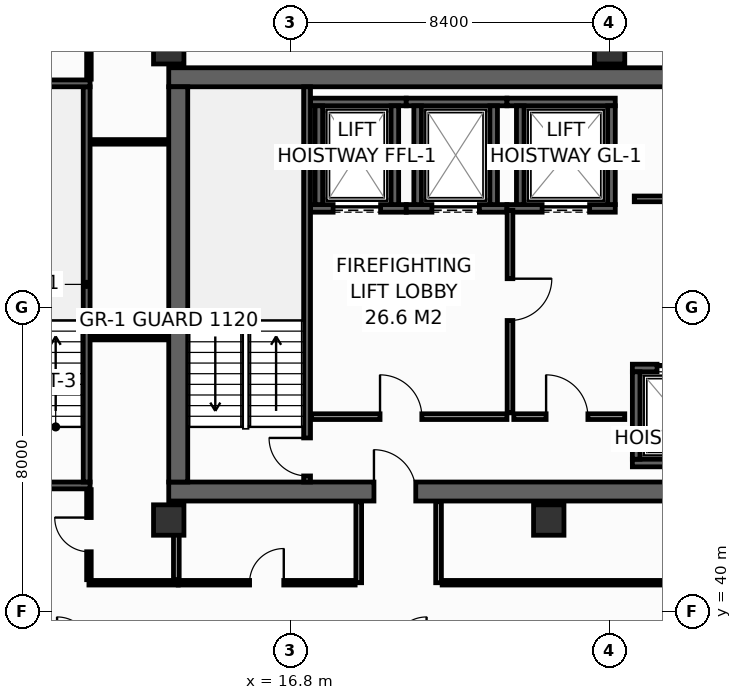
"""IFC4 building model, lengths in metres.
Left out: names, types, materials, properties, quantities, classifications, styles, units other than length and angle.
Written with IfcOpenShell. Run it as: python <this file> out.ifc"""

import sys

from ifc_helpers import new_model, si_unit, direction, frame, frame_2d, origin, origin_2d, place, context, subcontext, project, spatial, rectangle, hollow_rectangle, extrude, element, fill, save


model = new_model("IFC4")
c1 = context("Model", 3, precision=1e-05, world=origin(), true_north=direction((0.0, 1.0)))
c2 = subcontext(c1, "Body", "Model", "MODEL_VIEW")
j1 = project(units=[si_unit("LENGTHUNIT", "METRE"), si_unit("PLANEANGLEUNIT", "RADIAN")], contexts=[c1])
p1 = place(None, origin())
s1 = spatial("IfcSite", under=j1, at=p1, CompositionType="ELEMENT")
p2 = place(p1, origin())
s2 = spatial("IfcBuilding", under=s1, at=p2, CompositionType="ELEMENT")
p3 = place(p2, frame((0.0, 0.0, 220.8)))
s3 = spatial("IfcBuildingStorey", under=s2, at=p3, CompositionType="ELEMENT", Elevation=220.8)
p4 = place(p3, frame((13.6, 43.15, 0.0), z_axis=(0.0, 0.0, 1.0), x_axis=(1.0, 0.0, 0.0)))
e1 = element("IfcWall", 1, at=p4, inside=s3, PredefinedType="SHEAR", context=c2, shape_type="SweptSolid", body=[
    extrude(rectangle(XDim=32.7, YDim=0.5, at=frame_2d((16.35, 0.0))), origin(), (0.0, 0.0, 1.0), 3.35),
])
p5 = place(p4, frame((5.4, 0.0, 0.0)))
e2 = element("IfcOpeningElement", 2, at=p5, cuts=e1, PredefinedType="OPENING", context=c2, shape_type="SweptSolid", body=[
    extrude(rectangle(XDim=1.1, YDim=2.15, at=frame_2d((0.55, 1.075))), frame((0.0, 0.26, 0.0), z_axis=(0.0, -1.0, 0.0), x_axis=(1.0, 0.0, 0.0)), (0.0, 0.0, 1.0), 0.52),
])
p6 = place(p4, frame((25.6, 0.0, 0.0)))
e3 = element("IfcOpeningElement", 3, at=p6, cuts=e1, PredefinedType="OPENING", context=c2, shape_type="SweptSolid", body=[
    extrude(rectangle(XDim=1.1, YDim=2.15, at=frame_2d((0.55, 1.075))), frame((0.0, 0.26, 0.0), z_axis=(0.0, -1.0, 0.0), x_axis=(1.0, 0.0, 0.0)), (0.0, 0.0, 1.0), 0.52),
])
p7 = place(p3, frame((13.6, 54.05, 0.0), z_axis=(0.0, 0.0, 1.0), x_axis=(1.0, 0.0, 0.0)))
e4 = element("IfcWall", 4, at=p7, inside=s3, PredefinedType="SHEAR", context=c2, shape_type="SweptSolid", body=[
    extrude(rectangle(XDim=32.7, YDim=0.5, at=frame_2d((16.35, 0.0))), origin(), (0.0, 0.0, 1.0), 3.35),
])
p8 = place(p3, frame((13.85, 43.4, 0.0), z_axis=(0.0, 0.0, 1.0), x_axis=(0.0, 1.0, 0.0)))
e5 = element("IfcWall", 5, at=p8, inside=s3, PredefinedType="SHEAR", context=c2, shape_type="SweptSolid", body=[
    extrude(rectangle(XDim=10.4, YDim=0.5, at=frame_2d((5.2, 0.0))), origin(), (0.0, 0.0, 1.0), 3.35),
])
for number, where, z_axis, x_axis in (
    (6, (13.6, 54.8, 0.0), (0.0, 0.0, 1.0), (1.0, 0.0, 0.0)),
    (7, (25.2, 54.8, 0.0), (0.0, 0.0, 1.0), (1.0, 0.0, 0.0)),
    (8, (13.6, 42.4, 0.0), (0.0, 0.0, 1.0), (1.0, 0.0, 0.0)),
    (9, (23.6, 42.4, 0.0), (0.0, 0.0, 1.0), (1.0, 0.0, 0.0)),
):
    element("IfcColumn", number, at=place(p3, frame(where, z_axis=z_axis, x_axis=x_axis)), inside=s3, PredefinedType="COLUMN", context=c2, shape_type="SweptSolid", body=[
        extrude(hollow_rectangle(XDim=0.8, YDim=0.8, WallThickness=0.036, at=origin_2d()), origin(), (0.0, 0.0, 1.0), 3.8),
    ])
p9 = place(p3, frame((17.33, 50.6, 0.0), z_axis=(0.0, 0.0, 1.0), x_axis=(1.0, 0.0, 0.0)))
e10 = element("IfcWall", 10, at=p9, inside=s3, PredefinedType="SHEAR", context=c2, shape_type="SweptSolid", body=[
    extrude(rectangle(XDim=2.52, YDim=0.2, at=frame_2d((1.26, 0.0))), origin(), (0.0, 0.0, 1.0), 3.35),
])
p10 = place(p9, frame((0.595, 0.0, 0.0)))
e11 = element("IfcOpeningElement", 11, at=p10, cuts=e10, PredefinedType="OPENING", context=c2, shape_type="SweptSolid", body=[
    extrude(rectangle(XDim=1.25, YDim=2.3, at=frame_2d((0.625, 1.15))), frame((0.0, 0.11, 0.0), z_axis=(0.0, -1.0, 0.0), x_axis=(1.0, 0.0, 0.0)), (0.0, 0.0, 1.0), 0.22),
])
p11 = place(p3, frame((17.33, 53.4, 0.0), z_axis=(0.0, 0.0, 1.0), x_axis=(1.0, 0.0, 0.0)))
e12 = element("IfcWall", 12, at=p11, inside=s3, PredefinedType="SHEAR", context=c2, shape_type="SweptSolid", body=[
    extrude(rectangle(XDim=2.52, YDim=0.2, at=frame_2d((1.26, 0.0))), origin(), (0.0, 0.0, 1.0), 3.35),
])
for number, where, z_axis, x_axis in (
    (13, (17.55, 50.7, 0.0), (0.0, 0.0, 1.0), (0.0, 1.0, 0.0)),
    (14, (19.55, 50.7, 0.0), (0.0, 0.0, 1.0), (0.0, 1.0, 0.0)),
):
    element("IfcWall", number, at=place(p3, frame(where, z_axis=z_axis, x_axis=x_axis)), inside=s3, PredefinedType="SHEAR", context=c2, shape_type="SweptSolid", body=[
        extrude(rectangle(XDim=2.6, YDim=0.2, at=frame_2d((1.3, 0.0))), origin(), (0.0, 0.0, 1.0), 3.35),
    ])
p12 = place(p3, frame((19.85, 50.6, 0.0), z_axis=(0.0, 0.0, 1.0), x_axis=(1.0, 0.0, 0.0)))
e15 = element("IfcWall", 15, at=p12, inside=s3, PredefinedType="SHEAR", context=c2, shape_type="SweptSolid", body=[
    extrude(rectangle(XDim=2.65, YDim=0.2, at=frame_2d((1.325, 0.0))), origin(), (0.0, 0.0, 1.0), 3.35),
])
p13 = place(p12, frame((0.675, 0.0, 0.0)))
e16 = element("IfcOpeningElement", 16, at=p13, cuts=e15, PredefinedType="OPENING", context=c2, shape_type="SweptSolid", body=[
    extrude(rectangle(XDim=1.25, YDim=2.3, at=frame_2d((0.625, 1.15))), frame((0.0, 0.11, 0.0), z_axis=(0.0, -1.0, 0.0), x_axis=(1.0, 0.0, 0.0)), (0.0, 0.0, 1.0), 0.22),
])
p14 = place(p3, frame((19.85, 53.4, 0.0), z_axis=(0.0, 0.0, 1.0), x_axis=(1.0, 0.0, 0.0)))
e17 = element("IfcWall", 17, at=p14, inside=s3, PredefinedType="SHEAR", context=c2, shape_type="SweptSolid", body=[
    extrude(rectangle(XDim=2.65, YDim=0.2, at=frame_2d((1.325, 0.0))), origin(), (0.0, 0.0, 1.0), 3.35),
])
for number, where, z_axis, x_axis in (
    (18, (20.15, 50.7, 0.0), (0.0, 0.0, 1.0), (0.0, 1.0, 0.0)),
    (19, (22.15, 50.7, 0.0), (0.0, 0.0, 1.0), (0.0, 1.0, 0.0)),
):
    element("IfcWall", number, at=place(p3, frame(where, z_axis=z_axis, x_axis=x_axis)), inside=s3, PredefinedType="SHEAR", context=c2, shape_type="SweptSolid", body=[
        extrude(rectangle(XDim=2.6, YDim=0.2, at=frame_2d((1.3, 0.0))), origin(), (0.0, 0.0, 1.0), 3.35),
    ])
p15 = place(p3, frame((22.5, 50.6, 0.0), z_axis=(0.0, 0.0, 1.0), x_axis=(1.0, 0.0, 0.0)))
e20 = element("IfcWall", 20, at=p15, inside=s3, PredefinedType="SHEAR", context=c2, shape_type="SweptSolid", body=[
    extrude(rectangle(XDim=2.85, YDim=0.2, at=frame_2d((1.425, 0.0))), origin(), (0.0, 0.0, 1.0), 3.35),
])
p16 = place(p15, frame((0.925, 0.0, 0.0)))
e21 = element("IfcOpeningElement", 21, at=p16, cuts=e20, PredefinedType="OPENING", context=c2, shape_type="SweptSolid", body=[
    extrude(rectangle(XDim=1.25, YDim=2.3, at=frame_2d((0.625, 1.15))), frame((0.0, 0.11, 0.0), z_axis=(0.0, -1.0, 0.0), x_axis=(1.0, 0.0, 0.0)), (0.0, 0.0, 1.0), 0.22),
])
p17 = place(p3, frame((22.5, 53.4, 0.0), z_axis=(0.0, 0.0, 1.0), x_axis=(1.0, 0.0, 0.0)))
e22 = element("IfcWall", 22, at=p17, inside=s3, PredefinedType="SHEAR", context=c2, shape_type="SweptSolid", body=[
    extrude(rectangle(XDim=2.85, YDim=0.2, at=frame_2d((1.425, 0.0))), origin(), (0.0, 0.0, 1.0), 3.35),
])
for number, where, z_axis, x_axis in (
    (23, (22.85, 50.7, 0.0), (0.0, 0.0, 1.0), (0.0, 1.0, 0.0)),
    (24, (25.25, 50.7, 0.0), (0.0, 0.0, 1.0), (0.0, 1.0, 0.0)),
):
    element("IfcWall", number, at=place(p3, frame(where, z_axis=z_axis, x_axis=x_axis)), inside=s3, PredefinedType="SHEAR", context=c2, shape_type="SweptSolid", body=[
        extrude(rectangle(XDim=2.6, YDim=0.2, at=frame_2d((1.3, 0.0))), origin(), (0.0, 0.0, 1.0), 3.35),
    ])
p18 = place(p3, frame((25.8, 43.9, 0.0), z_axis=(0.0, 0.0, 1.0), x_axis=(1.0, 0.0, 0.0)))
e25 = element("IfcWall", 25, at=p18, inside=s3, PredefinedType="SHEAR", context=c2, shape_type="SweptSolid", body=[
    extrude(rectangle(XDim=2.575, YDim=0.2, at=frame_2d((1.288, 0.0))), origin(), (0.0, 0.0, 1.0), 3.13),
])
p19 = place(p3, frame((25.8, 46.4, 0.0), z_axis=(0.0, 0.0, 1.0), x_axis=(1.0, 0.0, 0.0)))
e26 = element("IfcWall", 26, at=p19, inside=s3, PredefinedType="SHEAR", context=c2, shape_type="SweptSolid", body=[
    extrude(rectangle(XDim=2.575, YDim=0.2, at=frame_2d((1.288, 0.0))), origin(), (0.0, 0.0, 1.0), 3.13),
])
p20 = place(p19, frame((0.65, 0.0, 0.0)))
e27 = element("IfcOpeningElement", 27, at=p20, cuts=e26, PredefinedType="OPENING", context=c2, shape_type="SweptSolid", body=[
    extrude(rectangle(XDim=1.1, YDim=2.2, at=frame_2d((0.55, 1.1))), frame((0.0, 0.11, 0.0), z_axis=(0.0, -1.0, 0.0), x_axis=(1.0, 0.0, 0.0)), (0.0, 0.0, 1.0), 0.22),
])
p21 = place(p3, frame((25.9, 44.0, 0.0), z_axis=(0.0, 0.0, 1.0), x_axis=(0.0, 1.0, 0.0)))
e28 = element("IfcWall", 28, at=p21, inside=s3, PredefinedType="SHEAR", context=c2, shape_type="SweptSolid", body=[
    extrude(rectangle(XDim=2.3, YDim=0.2, at=frame_2d((1.15, 0.0))), origin(), (0.0, 0.0, 1.0), 3.13),
])
p22 = place(p3, frame((17.24, 43.4, 0.0), z_axis=(0.0, 0.0, 1.0), x_axis=(0.0, 1.0, 0.0)))
e29 = element("IfcWall", 29, at=p22, inside=s3, PredefinedType="SHEAR", context=c2, shape_type="SweptSolid", body=[
    extrude(rectangle(XDim=10.4, YDim=0.18, at=frame_2d((5.2, 0.0))), origin(), (0.0, 0.0, 1.0), 3.35),
])
p23 = place(p22, frame((0.16, 0.0, 0.0)))
e30 = element("IfcOpeningElement", 30, at=p23, cuts=e29, PredefinedType="OPENING", context=c2, shape_type="SweptSolid", body=[
    extrude(rectangle(XDim=1.0, YDim=2.15, at=frame_2d((0.5, 1.075))), frame((0.0, 0.1, 0.0), z_axis=(0.0, -1.0, 0.0), x_axis=(1.0, 0.0, 0.0)), (0.0, 0.0, 1.0), 0.2),
])
p24 = place(p3, frame((8.12, 43.31, 0.0), z_axis=(0.0, 0.0, 1.0), x_axis=(1.0, 0.0, 0.0)))
e31 = element("IfcWall", 31, at=p24, inside=s3, PredefinedType="SHEAR", context=c2, shape_type="SweptSolid", body=[
    extrude(rectangle(XDim=3.41, YDim=0.18, at=frame_2d((1.705, 0.0))), origin(), (0.0, 0.0, 1.0), 3.35),
])
p25 = place(p24, frame((1.15, 0.0, 0.0)))
e32 = element("IfcOpeningElement", 32, at=p25, cuts=e31, PredefinedType="OPENING", context=c2, shape_type="SweptSolid", body=[
    extrude(rectangle(XDim=1.1, YDim=2.15, at=frame_2d((0.55, 1.075))), frame((0.0, 0.1, 0.0), z_axis=(0.0, -1.0, 0.0), x_axis=(1.0, 0.0, 0.0)), (0.0, 0.0, 1.0), 0.2),
])
p26 = place(p3, frame((11.44, 43.4, 0.0), z_axis=(0.0, 0.0, 1.0), x_axis=(0.0, 1.0, 0.0)))
e33 = element("IfcWall", 33, at=p26, inside=s3, PredefinedType="SHEAR", context=c2, shape_type="SweptSolid", body=[
    extrude(rectangle(XDim=10.4, YDim=0.18, at=frame_2d((5.2, 0.0))), origin(), (0.0, 0.0, 1.0), 3.35),
])
p27 = place(p3, frame((11.53, 53.89, 0.0), z_axis=(0.0, 0.0, 1.0), x_axis=(-1.0, 0.0, 0.0)))
e34 = element("IfcWall", 34, at=p27, inside=s3, PredefinedType="SHEAR", context=c2, shape_type="SweptSolid", body=[
    extrude(rectangle(XDim=3.41, YDim=0.18, at=frame_2d((1.705, 0.0))), origin(), (0.0, 0.0, 1.0), 3.35),
])
p28 = place(p3, frame((17.36, 45.12, 0.0), z_axis=(0.0, 0.0, 1.0), x_axis=(1.0, 0.0, 0.0)))
e35 = element("IfcWall", 35, at=p28, inside=s3, PredefinedType="PARTITIONING", context=c2, shape_type="SweptSolid", body=[
    extrude(rectangle(XDim=5.14, YDim=0.15, at=frame_2d((2.57, 0.0))), origin(), (0.0, 0.0, 1.0), 3.35),
])
p29 = place(p28, frame((1.8, 0.0, 0.0)))
e36 = element("IfcOpeningElement", 36, at=p29, cuts=e35, PredefinedType="OPENING", context=c2, shape_type="SweptSolid", body=[
    extrude(rectangle(XDim=1.1, YDim=2.15, at=frame_2d((0.55, 1.075))), frame((0.0, 0.085, 0.0), z_axis=(0.0, -1.0, 0.0), x_axis=(1.0, 0.0, 0.0)), (0.0, 0.0, 1.0), 0.17),
])
p30 = place(p3, frame((22.58, 50.55, 0.0), z_axis=(0.0, 0.0, 1.0), x_axis=(0.0, -1.0, 0.0)))
e37 = element("IfcWall", 37, at=p30, inside=s3, PredefinedType="PARTITIONING", context=c2, shape_type="SweptSolid", body=[
    extrude(rectangle(XDim=5.33, YDim=0.15, at=frame_2d((2.665, 0.0))), origin(), (0.0, 0.0, 1.0), 3.35),
])
p31 = place(p30, frame((1.8, 0.0, 0.0)))
e38 = element("IfcOpeningElement", 38, at=p31, cuts=e37, PredefinedType="OPENING", context=c2, shape_type="SweptSolid", body=[
    extrude(rectangle(XDim=1.1, YDim=2.15, at=frame_2d((0.55, 1.075))), frame((0.0, 0.085, 0.0), z_axis=(0.0, -1.0, 0.0), x_axis=(1.0, 0.0, 0.0)), (0.0, 0.0, 1.0), 0.17),
])
p32 = place(p3, frame((22.68, 45.12, 0.0), z_axis=(0.0, 0.0, 1.0), x_axis=(1.0, 0.0, 0.0)))
e39 = element("IfcWall", 39, at=p32, inside=s3, PredefinedType="PARTITIONING", context=c2, shape_type="SweptSolid", body=[
    extrude(rectangle(XDim=2.92, YDim=0.15, at=frame_2d((1.46, 0.0))), origin(), (0.0, 0.0, 1.0), 3.35),
])
p33 = place(p32, frame((0.85, 0.0, 0.0)))
e40 = element("IfcOpeningElement", 40, at=p33, cuts=e39, PredefinedType="OPENING", context=c2, shape_type="SweptSolid", body=[
    extrude(rectangle(XDim=1.1, YDim=2.15, at=frame_2d((0.55, 1.075))), frame((0.0, 0.085, 0.0), z_axis=(0.0, -1.0, 0.0), x_axis=(1.0, 0.0, 0.0)), (0.0, 0.0, 1.0), 0.17),
])
p34 = place(p3, frame((25.85, 50.85, 0.0), z_axis=(0.0, 0.0, 1.0), x_axis=(1.0, 0.0, 0.0)))
e41 = element("IfcWall", 41, at=p34, inside=s3, PredefinedType="PARTITIONING", context=c2, shape_type="SweptSolid", body=[
    extrude(rectangle(XDim=7.65, YDim=0.15, at=frame_2d((3.825, 0.0))), origin(), (0.0, 0.0, 1.0), 3.35),
])
p35 = place(p34, frame((1.25, 0.0, 0.0)))
e42 = element("IfcOpeningElement", 42, at=p35, cuts=e41, PredefinedType="OPENING", context=c2, shape_type="SweptSolid", body=[
    extrude(rectangle(XDim=0.95, YDim=2.15, at=frame_2d((0.475, 1.075))), frame((0.0, 0.085, 0.0), z_axis=(0.0, -1.0, 0.0), x_axis=(1.0, 0.0, 0.0)), (0.0, 0.0, 1.0), 0.17),
])
p36 = place(p3, frame((11.5, 40.75, 0.0), z_axis=(0.0, 0.0, 1.0), x_axis=(1.0, 0.0, 0.0)))
e43 = element("IfcWall", 43, at=p36, inside=s3, PredefinedType="PARTITIONING", context=c2, shape_type="SweptSolid", body=[
    extrude(rectangle(XDim=2.35, YDim=0.12, at=frame_2d((1.175, 0.0))), origin(), (0.0, 0.0, 1.0), 3.35),
])
p37 = place(p3, frame((11.55, 52.35, 0.0), z_axis=(0.0, 0.0, 1.0), x_axis=(1.0, 0.0, 0.0)))
e44 = element("IfcWall", 44, at=p37, inside=s3, PredefinedType="PARTITIONING", context=c2, shape_type="SweptSolid", body=[
    extrude(rectangle(XDim=2.03, YDim=0.12, at=frame_2d((1.015, 0.0))), origin(), (0.0, 0.0, 1.0), 3.35),
])
p38 = place(p3, frame((11.5, 54.0, 0.0), z_axis=(0.0, 0.0, 1.0), x_axis=(0.0, 1.0, 0.0)))
e45 = element("IfcWall", 45, at=p38, inside=s3, PredefinedType="PARTITIONING", context=c2, shape_type="SweptSolid", body=[
    extrude(rectangle(XDim=1.995, YDim=0.12, at=frame_2d((0.998, 0.0))), origin(), (0.0, 0.0, 1.0), 2.735),
])
p39 = place(p3, frame((11.55, 47.2, 0.0), z_axis=(0.0, 0.0, 1.0), x_axis=(1.0, 0.0, 0.0)))
e46 = element("IfcWall", 46, at=p39, inside=s3, PredefinedType="PARTITIONING", context=c2, shape_type="SweptSolid", body=[
    extrude(rectangle(XDim=2.03, YDim=0.12, at=frame_2d((1.015, 0.0))), origin(), (0.0, 0.0, 1.0), 3.35),
])
p40 = place(p3, frame((11.5, 40.83, 0.0), z_axis=(0.0, 0.0, 1.0), x_axis=(0.0, 1.0, 0.0)))
e47 = element("IfcWall", 47, at=p40, inside=s3, PredefinedType="PARTITIONING", context=c2, shape_type="SweptSolid", body=[
    extrude(rectangle(XDim=2.37, YDim=0.12, at=frame_2d((1.185, 0.0))), origin(), (0.0, 0.0, 1.0), 2.635),
])
p41 = place(p40, frame((0.735, 0.0, 0.0)))
e48 = element("IfcOpeningElement", 48, at=p41, cuts=e47, PredefinedType="OPENING", context=c2, shape_type="SweptSolid", body=[
    extrude(rectangle(XDim=0.9, YDim=2.1, at=frame_2d((0.45, 1.05))), frame((0.0, 0.07, 0.0), z_axis=(0.0, -1.0, 0.0), x_axis=(1.0, 0.0, 0.0)), (0.0, 0.0, 1.0), 0.14),
])
p42 = place(p3, frame((13.8, 40.83, 0.0), z_axis=(0.0, 0.0, 1.0), x_axis=(0.0, 1.0, 0.0)))
e49 = element("IfcWall", 49, at=p42, inside=s3, PredefinedType="PARTITIONING", context=c2, shape_type="SweptSolid", body=[
    extrude(rectangle(XDim=2.05, YDim=0.15, at=frame_2d((1.025, 0.0))), origin(), (0.0, 0.0, 1.0), 3.35),
])
for number, where, z_axis, x_axis in (
    (50, (18.6, 40.75, 0.0), (0.0, 0.0, 1.0), (0.0, 1.0, 0.0)),
    (51, (20.7, 40.75, 0.0), (0.0, 0.0, 1.0), (0.0, 1.0, 0.0)),
):
    element("IfcWall", number, at=place(p3, frame(where, z_axis=z_axis, x_axis=x_axis)), inside=s3, PredefinedType="PARTITIONING", context=c2, shape_type="SweptSolid", body=[
        extrude(rectangle(XDim=2.13, YDim=0.15, at=frame_2d((1.065, 0.0))), origin(), (0.0, 0.0, 1.0), 3.35),
    ])
p43 = place(p3, frame((13.85, 40.75, 0.0), z_axis=(0.0, 0.0, 1.0), x_axis=(1.0, 0.0, 0.0)))
e52 = element("IfcWall", 52, at=p43, inside=s3, PredefinedType="PARTITIONING", context=c2, shape_type="SweptSolid", body=[
    extrude(rectangle(XDim=4.655, YDim=0.12, at=frame_2d((2.327, 0.0))), origin(), (0.0, 0.0, 1.0), 3.35),
])
p44 = place(p43, frame((1.877, 0.0, 0.0)))
e53 = element("IfcOpeningElement", 53, at=p44, cuts=e52, PredefinedType="OPENING", context=c2, shape_type="SweptSolid", body=[
    extrude(rectangle(XDim=0.9, YDim=2.1, at=frame_2d((0.45, 1.05))), frame((0.0, 0.07, 0.0), z_axis=(0.0, -1.0, 0.0), x_axis=(1.0, 0.0, 0.0)), (0.0, 0.0, 1.0), 0.14),
])
p45 = place(p3, frame((20.795, 40.75, 0.0), z_axis=(0.0, 0.0, 1.0), x_axis=(1.0, 0.0, 0.0)))
e54 = element("IfcWall", 54, at=p45, inside=s3, PredefinedType="PARTITIONING", context=c2, shape_type="SweptSolid", body=[
    extrude(rectangle(XDim=17.91, YDim=0.12, at=frame_2d((8.955, 0.0))), origin(), (0.0, 0.0, 1.0), 2.635),
])
p46 = place(p45, frame((8.505, 0.0, 0.0)))
e55 = element("IfcOpeningElement", 55, at=p46, cuts=e54, PredefinedType="OPENING", context=c2, shape_type="SweptSolid", body=[
    extrude(rectangle(XDim=0.9, YDim=2.1, at=frame_2d((0.45, 1.05))), frame((0.0, 0.07, 0.0), z_axis=(0.0, -1.0, 0.0), x_axis=(1.0, 0.0, 0.0)), (0.0, 0.0, 1.0), 0.14),
])
p47 = place(p10, origin())
e56 = element("IfcDoor", 56, at=p47, inside=s3, OperationType="SLIDING_TO_LEFT", PredefinedType="DOOR", context=c2, shape_type="SweptSolid", body=[
    extrude(rectangle(XDim=1.25, YDim=2.3, at=frame_2d((0.625, 1.15))), frame((0.0, 0.025, 0.0), z_axis=(0.0, -1.0, 0.0), x_axis=(1.0, 0.0, 0.0)), (0.0, 0.0, 1.0), 0.05),
])
fill(e11, e56)
p48 = place(p13, origin())
e57 = element("IfcDoor", 57, at=p48, inside=s3, OperationType="SLIDING_TO_LEFT", PredefinedType="DOOR", context=c2, shape_type="SweptSolid", body=[
    extrude(rectangle(XDim=1.25, YDim=2.3, at=frame_2d((0.625, 1.15))), frame((0.0, 0.025, 0.0), z_axis=(0.0, -1.0, 0.0), x_axis=(1.0, 0.0, 0.0)), (0.0, 0.0, 1.0), 0.05),
])
fill(e16, e57)
p49 = place(p16, origin())
e58 = element("IfcDoor", 58, at=p49, inside=s3, OperationType="SLIDING_TO_LEFT", PredefinedType="DOOR", context=c2, shape_type="SweptSolid", body=[
    extrude(rectangle(XDim=1.25, YDim=2.3, at=frame_2d((0.625, 1.15))), frame((0.0, 0.025, 0.0), z_axis=(0.0, -1.0, 0.0), x_axis=(1.0, 0.0, 0.0)), (0.0, 0.0, 1.0), 0.05),
])
fill(e21, e58)
p50 = place(p20, origin())
e59 = element("IfcDoor", 59, at=p50, inside=s3, OperationType="SLIDING_TO_LEFT", PredefinedType="DOOR", context=c2, shape_type="SweptSolid", body=[
    extrude(rectangle(XDim=1.1, YDim=2.2, at=frame_2d((0.55, 1.1))), frame((0.0, 0.025, 0.0), z_axis=(0.0, -1.0, 0.0), x_axis=(1.0, 0.0, 0.0)), (0.0, 0.0, 1.0), 0.05),
])
fill(e27, e59)
p51 = place(p23, origin())
e60 = element("IfcDoor", 60, at=p51, inside=s3, OperationType="SINGLE_SWING_RIGHT", PredefinedType="DOOR", context=c2, shape_type="SweptSolid", body=[
    extrude(rectangle(XDim=1.0, YDim=2.15, at=frame_2d((0.5, 1.075))), frame((0.0, 0.025, 0.0), z_axis=(0.0, -1.0, 0.0), x_axis=(1.0, 0.0, 0.0)), (0.0, 0.0, 1.0), 0.05),
])
fill(e30, e60)
p52 = place(p29, origin())
e61 = element("IfcDoor", 61, at=p52, inside=s3, OperationType="SINGLE_SWING_LEFT", PredefinedType="DOOR", context=c2, shape_type="SweptSolid", body=[
    extrude(rectangle(XDim=1.1, YDim=2.15, at=frame_2d((0.55, 1.075))), frame((0.0, 0.025, 0.0), z_axis=(0.0, -1.0, 0.0), x_axis=(1.0, 0.0, 0.0)), (0.0, 0.0, 1.0), 0.05),
])
fill(e36, e61)
p53 = place(p31, origin())
e62 = element("IfcDoor", 62, at=p53, inside=s3, OperationType="SINGLE_SWING_LEFT", PredefinedType="DOOR", context=c2, shape_type="SweptSolid", body=[
    extrude(rectangle(XDim=1.1, YDim=2.15, at=frame_2d((0.55, 1.075))), frame((0.0, 0.025, 0.0), z_axis=(0.0, -1.0, 0.0), x_axis=(1.0, 0.0, 0.0)), (0.0, 0.0, 1.0), 0.05),
])
fill(e38, e62)
p54 = place(p33, origin())
e63 = element("IfcDoor", 63, at=p54, inside=s3, OperationType="SINGLE_SWING_LEFT", PredefinedType="DOOR", context=c2, shape_type="SweptSolid", body=[
    extrude(rectangle(XDim=1.1, YDim=2.15, at=frame_2d((0.55, 1.075))), frame((0.0, 0.025, 0.0), z_axis=(0.0, -1.0, 0.0), x_axis=(1.0, 0.0, 0.0)), (0.0, 0.0, 1.0), 0.05),
])
fill(e40, e63)
p55 = place(p5, origin())
e64 = element("IfcDoor", 64, at=p55, inside=s3, OperationType="SINGLE_SWING_LEFT", PredefinedType="DOOR", context=c2, shape_type="SweptSolid", body=[
    extrude(rectangle(XDim=1.1, YDim=2.15, at=frame_2d((0.55, 1.075))), frame((0.0, 0.025, 0.0), z_axis=(0.0, -1.0, 0.0), x_axis=(1.0, 0.0, 0.0)), (0.0, 0.0, 1.0), 0.05),
])
fill(e2, e64)
p56 = place(p41, origin())
e65 = element("IfcDoor", 65, at=p56, inside=s3, OperationType="SINGLE_SWING_RIGHT", PredefinedType="DOOR", context=c2, shape_type="SweptSolid", body=[
    extrude(rectangle(XDim=0.9, YDim=2.1, at=frame_2d((0.45, 1.05))), frame((0.0, 0.025, 0.0), z_axis=(0.0, -1.0, 0.0), x_axis=(1.0, 0.0, 0.0)), (0.0, 0.0, 1.0), 0.05),
])
fill(e48, e65)
p57 = place(p44, origin())
e66 = element("IfcDoor", 66, at=p57, inside=s3, OperationType="SINGLE_SWING_RIGHT", PredefinedType="DOOR", context=c2, shape_type="SweptSolid", body=[
    extrude(rectangle(XDim=0.9, YDim=2.1, at=frame_2d((0.45, 1.05))), frame((0.0, 0.025, 0.0), z_axis=(0.0, -1.0, 0.0), x_axis=(1.0, 0.0, 0.0)), (0.0, 0.0, 1.0), 0.05),
])
fill(e53, e66)
save(model, sys.argv[1])
